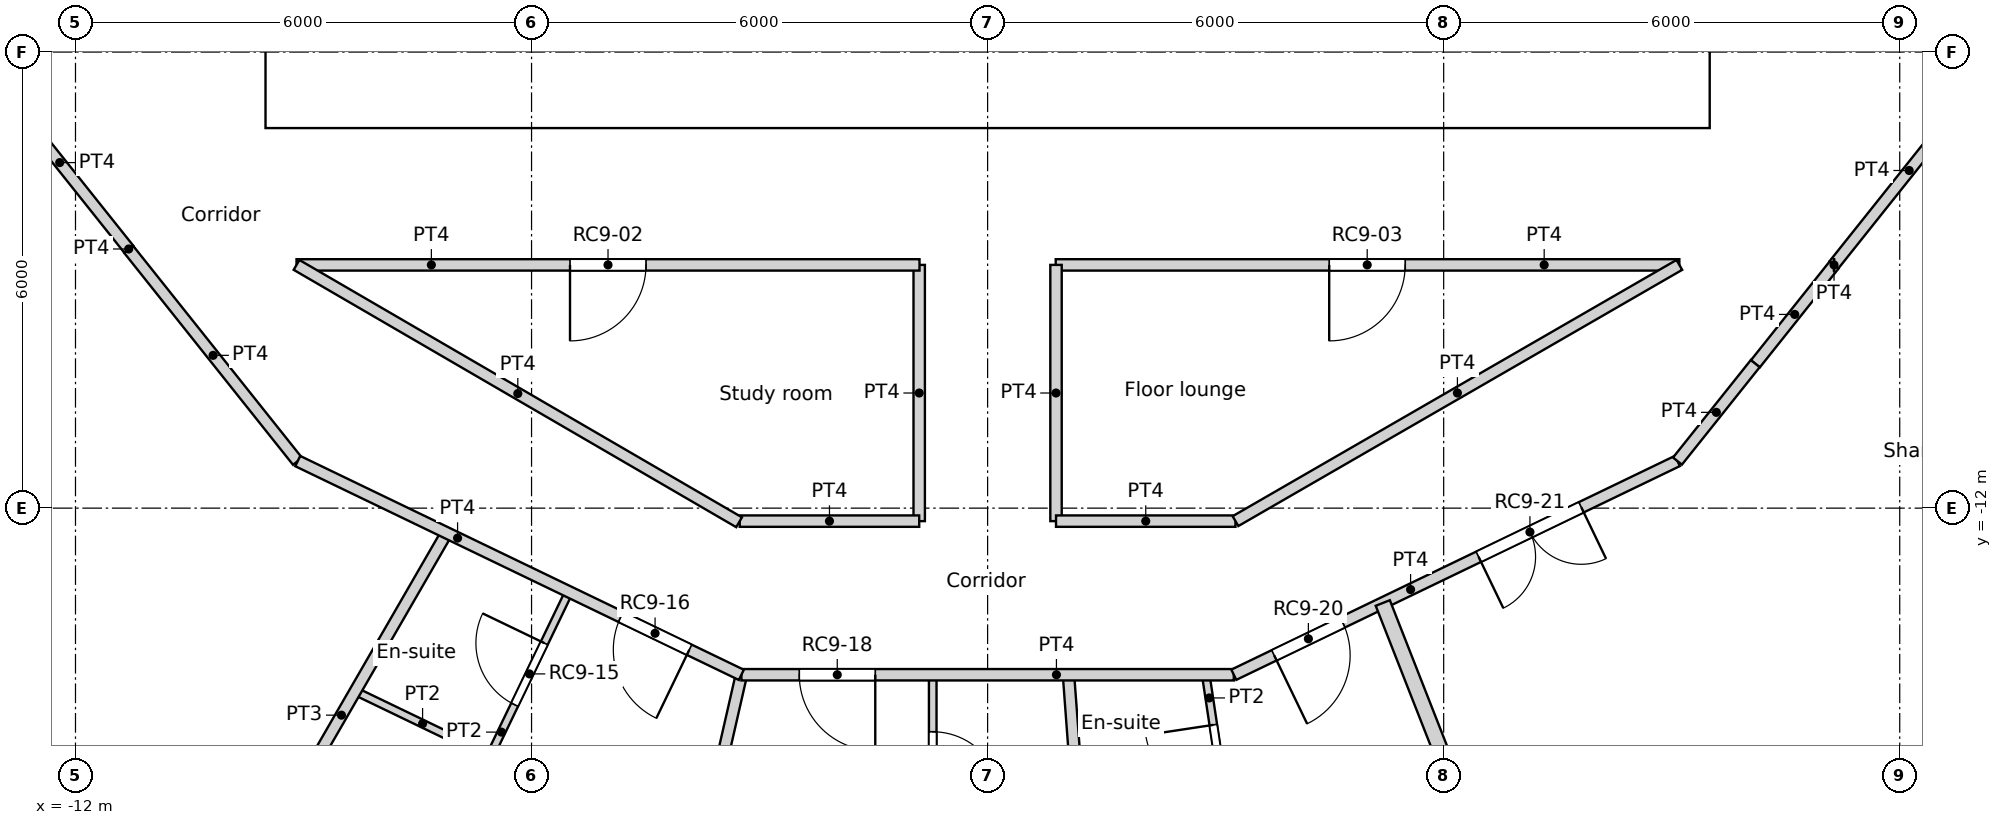
"""IFC4 building model, lengths in metres.
Left out: names, types, materials, properties, quantities, classifications, styles, units other than length and angle.
Written with IfcOpenShell. Run it as: python <this file> out.ifc"""

import sys

from ifc_helpers import new_model, si_unit, direction, frame, frame_2d, origin, origin_2d, place, context, subcontext, project, spatial, rectangle, circle, extrude, element, fill, save


model = new_model("IFC4")
c1 = context("Model", 3, precision=1e-05, world=origin(), true_north=direction((0.0, 1.0)))
c2 = subcontext(c1, "Body", "Model", "MODEL_VIEW")
j1 = project(units=[si_unit("LENGTHUNIT", "METRE"), si_unit("PLANEANGLEUNIT", "RADIAN")], contexts=[c1])
p1 = place(None, origin())
s1 = spatial("IfcSite", under=j1, at=p1, CompositionType="ELEMENT")
p2 = place(p1, origin())
s2 = spatial("IfcBuilding", under=s1, at=p2, CompositionType="ELEMENT")
p3 = place(p2, frame((0.0, 0.0, 316.2)))
s3 = spatial("IfcBuildingStorey", under=s2, at=p3, CompositionType="ELEMENT", Elevation=316.2)
p4 = place(p3, frame((11.735, -14.716, 0.0), z_axis=(0.0, 0.0, 1.0), x_axis=(1.0, 0.0, 0.0)))
e1 = element("IfcColumn", 1, at=p4, inside=s3, PredefinedType="COLUMN", context=c2, shape_type="SweptSolid", body=[
    extrude(circle(Radius=0.45, at=origin_2d()), origin(), (0.0, 0.0, 1.0), 3.6),
])
p5 = place(p3, frame((-9.5, -6.7, 0.0), z_axis=(0.0, 0.0, 1.0), x_axis=(1.0, 0.0, 0.0)))
e2 = element("IfcWall", 2, at=p5, inside=s3, PredefinedType="SOLIDWALL", context=c2, shape_type="SweptSolid", body=[
    extrude(rectangle(XDim=19.0, YDim=0.6, at=frame_2d((9.5, 0.0))), origin(), (0.0, 0.0, 1.0), 3.6),
])
p6 = place(p5, frame((10.4, 0.0, 0.0)))
e3 = element("IfcOpeningElement", 3, at=p6, cuts=e2, PredefinedType="OPENING", context=c2, shape_type="SweptSolid", body=[
    extrude(rectangle(XDim=1.0, YDim=2.1, at=frame_2d((0.5, 1.05))), frame((0.0, 0.3, 0.0), z_axis=(0.0, -1.0, 0.0), x_axis=(1.0, 0.0, 0.0)), (0.0, 0.0, 1.0), 0.6),
])
p7 = place(p5, frame((5.35, 0.0, 0.0)))
e4 = element("IfcOpeningElement", 4, at=p7, cuts=e2, PredefinedType="OPENING", context=c2, shape_type="SweptSolid", body=[
    extrude(rectangle(XDim=1.7, YDim=2.1, at=frame_2d((0.85, 1.05))), frame((0.0, 0.3, 0.0), z_axis=(0.0, -1.0, 0.0), x_axis=(1.0, 0.0, 0.0)), (0.0, 0.0, 1.0), 0.6),
])
p8 = place(p5, frame((11.95, 0.0, 0.0)))
e5 = element("IfcOpeningElement", 5, at=p8, cuts=e2, PredefinedType="OPENING", context=c2, shape_type="SweptSolid", body=[
    extrude(rectangle(XDim=1.7, YDim=2.1, at=frame_2d((0.85, 1.05))), frame((0.0, 0.3, 0.0), z_axis=(0.0, -1.0, 0.0), x_axis=(1.0, 0.0, 0.0)), (0.0, 0.0, 1.0), 0.6),
])
p9 = place(p3, frame((-9.2, -6.4, 0.0), z_axis=(0.0, 0.0, 1.0), x_axis=(0.0, 1.0, 0.0)))
e6 = element("IfcWall", 6, at=p9, inside=s3, PredefinedType="SOLIDWALL", context=c2, shape_type="SweptSolid", body=[
    extrude(rectangle(XDim=12.8, YDim=0.6, at=frame_2d((6.4, 0.0))), origin(), (0.0, 0.0, 1.0), 3.6),
])
p10 = place(p3, frame((9.2, -6.4, 0.0), z_axis=(0.0, 0.0, 1.0), x_axis=(0.0, 1.0, 0.0)))
e7 = element("IfcWall", 7, at=p10, inside=s3, PredefinedType="SOLIDWALL", context=c2, shape_type="SweptSolid", body=[
    extrude(rectangle(XDim=12.8, YDim=0.6, at=frame_2d((6.4, 0.0))), origin(), (0.0, 0.0, 1.0), 3.6),
])
p11 = place(p10, frame((6.4, 0.0, 0.0)))
e8 = element("IfcOpeningElement", 8, at=p11, cuts=e7, PredefinedType="OPENING", context=c2, shape_type="SweptSolid", body=[
    extrude(rectangle(XDim=1.8, YDim=2.1, at=frame_2d((0.9, 1.05))), frame((0.0, 0.3, 0.0), z_axis=(0.0, -1.0, 0.0), x_axis=(1.0, 0.0, 0.0)), (0.0, 0.0, 1.0), 0.6),
])
for number, where, z_axis, x_axis in (
    (9, (-2.25, -6.4, 0.0), (0.0, 0.0, 1.0), (0.0, 1.0, 0.0)),
    (10, (0.55, -6.4, 0.0), (0.0, 0.0, 1.0), (0.0, 1.0, 0.0)),
    (11, (2.25, -6.4, 0.0), (0.0, 0.0, 1.0), (0.0, 1.0, 0.0)),
):
    element("IfcWall", number, at=place(p3, frame(where, z_axis=z_axis, x_axis=x_axis)), inside=s3, PredefinedType="SOLIDWALL", context=c2, shape_type="SweptSolid", body=[
        extrude(rectangle(XDim=3.15, YDim=0.3, at=frame_2d((1.575, 0.0))), origin(), (0.0, 0.0, 1.0), 3.25),
    ])
p12 = place(p3, frame((-9.092, -8.8, 0.0), z_axis=(0.0, 0.0, 1.0), x_axis=(1.0, 0.0, 0.0)))
e12 = element("IfcWall", 12, at=p12, inside=s3, PredefinedType="PARTITIONING", context=c2, shape_type="SweptSolid", body=[
    extrude(rectangle(XDim=8.196, YDim=0.15, at=frame_2d((4.098, 0.0))), origin(), (0.0, 0.0, 1.0), 3.25),
])
p13 = place(p12, frame((3.598, 0.0, 0.0)))
e13 = element("IfcOpeningElement", 13, at=p13, cuts=e12, PredefinedType="OPENING", context=c2, shape_type="SweptSolid", body=[
    extrude(rectangle(XDim=1.0, YDim=2.04, at=frame_2d((0.5, 1.02))), frame((0.0, 0.075, 0.0), z_axis=(0.0, -1.0, 0.0), x_axis=(1.0, 0.0, 0.0)), (0.0, 0.0, 1.0), 0.15),
])
p14 = place(p3, frame((-9.092, -8.8, 0.0), z_axis=(0.0, 0.0, 1.0), x_axis=(0.864470922103, -0.502682827277, 0.0)))
e14 = element("IfcWall", 14, at=p14, inside=s3, PredefinedType="PARTITIONING", context=c2, shape_type="SweptSolid", body=[
    extrude(rectangle(XDim=6.735, YDim=0.15, at=frame_2d((3.368, 0.0))), origin(), (0.0, 0.0, 1.0), 3.25),
])
p15 = place(p3, frame((0.896, -8.8, 0.0), z_axis=(0.0, 0.0, 1.0), x_axis=(1.0, 0.0, 0.0)))
e15 = element("IfcWall", 15, at=p15, inside=s3, PredefinedType="PARTITIONING", context=c2, shape_type="SweptSolid", body=[
    extrude(rectangle(XDim=8.205, YDim=0.15, at=frame_2d((4.102, 0.0))), origin(), (0.0, 0.0, 1.0), 3.25),
])
p16 = place(p15, frame((3.598, 0.0, 0.0)))
e16 = element("IfcOpeningElement", 16, at=p16, cuts=e15, PredefinedType="OPENING", context=c2, shape_type="SweptSolid", body=[
    extrude(rectangle(XDim=1.0, YDim=2.04, at=frame_2d((0.5, 1.02))), frame((0.0, 0.075, 0.0), z_axis=(0.0, -1.0, 0.0), x_axis=(1.0, 0.0, 0.0)), (0.0, 0.0, 1.0), 0.15),
])
p17 = place(p3, frame((-11.3, -8.596, 0.0), z_axis=(0.0, 0.0, 1.0), x_axis=(0.623165080354, -0.782090328944, 0.0)))
e17 = element("IfcWall", 17, at=p17, inside=s3, PredefinedType="PARTITIONING", context=c2, shape_type="SweptSolid", body=[
    extrude(rectangle(XDim=3.564, YDim=0.15, at=frame_2d((1.782, 0.0))), origin(), (0.0, 0.0, 1.0), 3.25),
])
p18 = place(p3, frame((-11.3, -8.596, 0.0), z_axis=(0.0, 0.0, 1.0), x_axis=(0.0, 1.0, 0.0)))
e18 = element("IfcWall", 18, at=p18, inside=s3, PredefinedType="PARTITIONING", context=c2, shape_type="SweptSolid", body=[
    extrude(rectangle(XDim=0.011, YDim=0.15, at=frame_2d((0.006, 0.0))), origin(), (0.0, 0.0, 1.0), 3.25),
])
p19 = place(p3, frame((11.137, -8.8, 0.0), z_axis=(0.0, 0.0, 1.0), x_axis=(-1.0, 0.0, 0.0)))
e19 = element("IfcWall", 19, at=p19, inside=s3, PredefinedType="PARTITIONING", context=c2, shape_type="SweptSolid", body=[
    extrude(rectangle(XDim=0.003, YDim=0.15, at=frame_2d((0.001, 0.0))), origin(), (0.0, 0.0, 1.0), 3.25),
])
p20 = place(p3, frame((10.101, -10.101, 0.0), z_axis=(0.0, 0.0, 1.0), x_axis=(0.623098344652, 0.782143498913, 0.0)))
e20 = element("IfcWall", 20, at=p20, inside=s3, PredefinedType="PARTITIONING", context=c2, shape_type="SweptSolid", body=[
    extrude(rectangle(XDim=1.661, YDim=0.15, at=frame_2d((0.831, 0.0))), origin(), (0.0, 0.0, 1.0), 3.25),
])
p21 = place(p3, frame((11.134, -8.8, 0.0), z_axis=(0.0, 0.0, 1.0), x_axis=(0.623476099415, 0.781842409606, 0.0)))
e21 = element("IfcWall", 21, at=p21, inside=s3, PredefinedType="PARTITIONING", context=c2, shape_type="SweptSolid", body=[
    extrude(rectangle(XDim=3.177, YDim=0.15, at=frame_2d((1.589, 0.0))), origin(), (0.0, 0.0, 1.0), 3.25),
])
p22 = place(p3, frame((-13.115, -6.316, 0.0), z_axis=(0.0, 0.0, 1.0), x_axis=(0.623446514299, -0.781866001185, 0.0)))
e22 = element("IfcWall", 22, at=p22, inside=s3, PredefinedType="PARTITIONING", context=c2, shape_type="SweptSolid", body=[
    extrude(rectangle(XDim=2.911, YDim=0.15, at=frame_2d((1.456, 0.0))), origin(), (0.0, 0.0, 1.0), 3.25),
])
p23 = place(p3, frame((-3.261, -12.171, 0.0), z_axis=(0.0, 0.0, 1.0), x_axis=(1.0, 0.0, 0.0)))
e23 = element("IfcWall", 23, at=p23, inside=s3, PredefinedType="PARTITIONING", context=c2, shape_type="SweptSolid", body=[
    extrude(rectangle(XDim=2.361, YDim=0.15, at=frame_2d((1.181, 0.0))), origin(), (0.0, 0.0, 1.0), 3.25),
])
for number, where, z_axis, x_axis in (
    (24, (-0.9, -12.171, 0.0), (0.0, 0.0, 1.0), (0.0, 1.0, 0.0)),
    (25, (0.9, -12.171, 0.0), (0.0, 0.0, 1.0), (0.0, 1.0, 0.0)),
):
    element("IfcWall", number, at=place(p3, frame(where, z_axis=z_axis, x_axis=x_axis)), inside=s3, PredefinedType="PARTITIONING", context=c2, shape_type="SweptSolid", body=[
        extrude(rectangle(XDim=3.371, YDim=0.15, at=frame_2d((1.686, 0.0))), origin(), (0.0, 0.0, 1.0), 3.25),
    ])
p24 = place(p3, frame((0.9, -12.171, 0.0), z_axis=(0.0, 0.0, 1.0), x_axis=(1.0, 0.0, 0.0)))
e26 = element("IfcWall", 26, at=p24, inside=s3, PredefinedType="PARTITIONING", context=c2, shape_type="SweptSolid", body=[
    extrude(rectangle(XDim=2.361, YDim=0.15, at=frame_2d((1.181, 0.0))), origin(), (0.0, 0.0, 1.0), 3.25),
])
p25 = place(p3, frame((3.261, -12.171, 0.0), z_axis=(0.0, 0.0, 1.0), x_axis=(0.866066809554, 0.499928276245, 0.0)))
e27 = element("IfcWall", 27, at=p25, inside=s3, PredefinedType="PARTITIONING", context=c2, shape_type="SweptSolid", body=[
    extrude(rectangle(XDim=6.743, YDim=0.15, at=frame_2d((3.371, 0.0))), origin(), (0.0, 0.0, 1.0), 3.25),
])
p26 = place(p3, frame((-9.076, -11.381, 0.0), z_axis=(0.0, 0.0, 1.0), x_axis=(0.900851590682, -0.434127183629, 0.0)))
e28 = element("IfcWall", 28, at=p26, inside=s3, PredefinedType="PARTITIONING", context=c2, shape_type="SweptSolid", body=[
    extrude(rectangle(XDim=6.479, YDim=0.15, at=frame_2d((3.239, 0.0))), origin(), (0.0, 0.0, 1.0), 3.25),
])
p27 = place(p26, frame((4.719, 0.0, 0.0)))
e29 = element("IfcOpeningElement", 29, at=p27, cuts=e28, PredefinedType="OPENING", context=c2, shape_type="SweptSolid", body=[
    extrude(rectangle(XDim=1.0, YDim=2.1, at=frame_2d((0.5, 1.05))), frame((0.0, 0.075, 0.0), z_axis=(0.0, -1.0, 0.0), x_axis=(1.0, 0.0, 0.0)), (0.0, 0.0, 1.0), 0.15),
])
p28 = place(p3, frame((-3.239, -14.192, 0.0), z_axis=(0.0, 0.0, 1.0), x_axis=(1.0, 0.0, 0.0)))
e30 = element("IfcWall", 30, at=p28, inside=s3, PredefinedType="PARTITIONING", context=c2, shape_type="SweptSolid", body=[
    extrude(rectangle(XDim=6.478, YDim=0.15, at=frame_2d((3.239, 0.0))), origin(), (0.0, 0.0, 1.0), 3.25),
])
p29 = place(p28, frame((0.761, 0.0, 0.0)))
e31 = element("IfcOpeningElement", 31, at=p29, cuts=e30, PredefinedType="OPENING", context=c2, shape_type="SweptSolid", body=[
    extrude(rectangle(XDim=1.0, YDim=2.1, at=frame_2d((0.5, 1.05))), frame((0.0, 0.075, 0.0), z_axis=(0.0, -1.0, 0.0), x_axis=(1.0, 0.0, 0.0)), (0.0, 0.0, 1.0), 0.15),
])
p30 = place(p3, frame((3.239, -14.192, 0.0), z_axis=(0.0, 0.0, 1.0), x_axis=(0.900851590682, 0.434127183629, 0.0)))
e32 = element("IfcWall", 32, at=p30, inside=s3, PredefinedType="PARTITIONING", context=c2, shape_type="SweptSolid", body=[
    extrude(rectangle(XDim=6.479, YDim=0.15, at=frame_2d((3.239, 0.0))), origin(), (0.0, 0.0, 1.0), 3.25),
])
p31 = place(p30, frame((0.589, 0.0, 0.0)))
e33 = element("IfcOpeningElement", 33, at=p31, cuts=e32, PredefinedType="OPENING", context=c2, shape_type="SweptSolid", body=[
    extrude(rectangle(XDim=1.0, YDim=2.1, at=frame_2d((0.5, 1.05))), frame((0.0, 0.075, 0.0), z_axis=(0.0, -1.0, 0.0), x_axis=(1.0, 0.0, 0.0)), (0.0, 0.0, 1.0), 0.15),
])
p32 = place(p30, frame((3.575, 0.0, 0.0)))
e34 = element("IfcOpeningElement", 34, at=p32, cuts=e32, PredefinedType="OPENING", context=c2, shape_type="SweptSolid", body=[
    extrude(rectangle(XDim=1.5, YDim=2.1, at=frame_2d((0.75, 1.05))), frame((0.0, 0.075, 0.0), z_axis=(0.0, -1.0, 0.0), x_axis=(1.0, 0.0, 0.0)), (0.0, 0.0, 1.0), 0.15),
])
p33 = place(p3, frame((9.076, -11.381, 0.0), z_axis=(0.0, 0.0, 1.0), x_axis=(0.623805208652, 0.781579849829, 0.0)))
e35 = element("IfcWall", 35, at=p33, inside=s3, PredefinedType="PARTITIONING", context=c2, shape_type="SweptSolid", body=[
    extrude(rectangle(XDim=1.64, YDim=0.15, at=frame_2d((0.82, 0.0))), origin(), (0.0, 0.0, 1.0), 3.25),
])
p34 = place(p3, frame((-9.886, -17.122, 0.0), z_axis=(0.0, 0.0, 1.0), x_axis=(0.500073446025, 0.865982995549, 0.0)))
e36 = element("IfcWall", 36, at=p34, inside=s3, PredefinedType="PARTITIONING", context=c2, shape_type="SweptSolid", body=[
    extrude(rectangle(XDim=5.539, YDim=0.15, at=frame_2d((2.77, 0.0))), origin(), (0.0, 0.0, 1.0), 3.25),
])
p35 = place(p3, frame((-8.319, -14.409, 0.0), z_axis=(0.0, 0.0, 1.0), x_axis=(0.900936932599, -0.433950047216, 0.0)))
e37 = element("IfcWall", 37, at=p35, inside=s3, PredefinedType="PARTITIONING", context=c2, shape_type="SweptSolid", body=[
    extrude(rectangle(XDim=1.966, YDim=0.1, at=frame_2d((0.983, 0.0))), origin(), (0.0, 0.0, 1.0), 3.25),
])
p36 = place(p3, frame((-6.548, -15.262, 0.0), z_axis=(0.0, 0.0, 1.0), x_axis=(0.433855388624, 0.900982520231, 0.0)))
e38 = element("IfcWall", 38, at=p36, inside=s3, PredefinedType="PARTITIONING", context=c2, shape_type="SweptSolid", body=[
    extrude(rectangle(XDim=2.399, YDim=0.1, at=frame_2d((1.2, 0.0))), origin(), (0.0, 0.0, 1.0), 3.25),
])
p37 = place(p36, frame((0.75, 0.0, 0.0)))
e39 = element("IfcOpeningElement", 39, at=p37, cuts=e38, PredefinedType="OPENING", context=c2, shape_type="SweptSolid", body=[
    extrude(rectangle(XDim=0.9, YDim=2.04, at=frame_2d((0.45, 1.02))), frame((0.0, 0.05, 0.0), z_axis=(0.0, -1.0, 0.0), x_axis=(1.0, 0.0, 0.0)), (0.0, 0.0, 1.0), 0.1),
])
p38 = place(p3, frame((-4.4, -19.276, 0.0), z_axis=(0.0, 0.0, 1.0), x_axis=(0.222612505682, 0.974907007008, 0.0)))
e40 = element("IfcWall", 40, at=p38, inside=s3, PredefinedType="PARTITIONING", context=c2, shape_type="SweptSolid", body=[
    extrude(rectangle(XDim=5.215, YDim=0.15, at=frame_2d((2.607, 0.0))), origin(), (0.0, 0.0, 1.0), 3.25),
])
p39 = place(p3, frame((-0.722, -16.592, 0.0), z_axis=(0.0, 0.0, 1.0), x_axis=(0.0, 1.0, 0.0)))
e41 = element("IfcWall", 41, at=p39, inside=s3, PredefinedType="PARTITIONING", context=c2, shape_type="SweptSolid", body=[
    extrude(rectangle(XDim=2.4, YDim=0.1, at=frame_2d((1.2, 0.0))), origin(), (0.0, 0.0, 1.0), 3.25),
])
p40 = place(p39, frame((0.75, 0.0, 0.0)))
e42 = element("IfcOpeningElement", 42, at=p40, cuts=e41, PredefinedType="OPENING", context=c2, shape_type="SweptSolid", body=[
    extrude(rectangle(XDim=0.9, YDim=2.04, at=frame_2d((0.45, 1.02))), frame((0.0, 0.05, 0.0), z_axis=(0.0, -1.0, 0.0), x_axis=(1.0, 0.0, 0.0)), (0.0, 0.0, 1.0), 0.1),
])
p41 = place(p3, frame((1.064, -14.192, 0.0), z_axis=(0.0, 0.0, 1.0), x_axis=(0.074353677934, -0.997231934195, 0.0)))
e43 = element("IfcWall", 43, at=p41, inside=s3, PredefinedType="PARTITIONING", context=c2, shape_type="SweptSolid", body=[
    extrude(rectangle(XDim=2.407, YDim=0.15, at=frame_2d((1.203, 0.0))), origin(), (0.0, 0.0, 1.0), 3.25),
])
p42 = place(p3, frame((2.87, -14.192, 0.0), z_axis=(0.0, 0.0, 1.0), x_axis=(0.148960349288, -0.988843169739, 0.0)))
e44 = element("IfcWall", 44, at=p42, inside=s3, PredefinedType="PARTITIONING", context=c2, shape_type="SweptSolid", body=[
    extrude(rectangle(XDim=2.234, YDim=0.1, at=frame_2d((1.117, 0.0))), origin(), (0.0, 0.0, 1.0), 3.25),
])
p43 = place(p42, frame((0.667, 0.0, 0.0)))
e45 = element("IfcOpeningElement", 45, at=p43, cuts=e44, PredefinedType="OPENING", context=c2, shape_type="SweptSolid", body=[
    extrude(rectangle(XDim=0.9, YDim=2.04, at=frame_2d((0.45, 1.02))), frame((0.0, 0.05, 0.0), z_axis=(0.0, -1.0, 0.0), x_axis=(1.0, 0.0, 0.0)), (0.0, 0.0, 1.0), 0.1),
])
p44 = place(p3, frame((5.199, -13.248, 0.0), z_axis=(0.0, 0.0, 1.0), x_axis=(0.365334662456, -0.930876245485, 0.0)))
e46 = element("IfcWall", 46, at=p44, inside=s3, PredefinedType="PARTITIONING", context=c2, shape_type="SweptSolid", body=[
    extrude(rectangle(XDim=5.54, YDim=0.2, at=frame_2d((2.77, 0.0))), origin(), (0.0, 0.0, 1.0), 3.25),
])
p45 = place(p6, origin())
e47 = element("IfcDoor", 47, at=p45, inside=s3, OperationType="SINGLE_SWING_LEFT", PredefinedType="DOOR", context=c2, shape_type="SweptSolid", body=[
    extrude(rectangle(XDim=1.0, YDim=2.1, at=frame_2d((0.5, 1.05))), frame((0.0, 0.025, 0.0), z_axis=(0.0, -1.0, 0.0), x_axis=(1.0, 0.0, 0.0)), (0.0, 0.0, 1.0), 0.05),
])
fill(e3, e47)
p46 = place(p7, origin())
e48 = element("IfcDoor", 48, at=p46, inside=s3, OperationType="DOUBLE_DOOR_SINGLE_SWING", PredefinedType="DOOR", context=c2, shape_type="SweptSolid", body=[
    extrude(rectangle(XDim=1.7, YDim=2.1, at=frame_2d((0.85, 1.05))), frame((0.0, 0.025, 0.0), z_axis=(0.0, -1.0, 0.0), x_axis=(1.0, 0.0, 0.0)), (0.0, 0.0, 1.0), 0.05),
])
fill(e4, e48)
p47 = place(p8, origin())
e49 = element("IfcDoor", 49, at=p47, inside=s3, OperationType="DOUBLE_DOOR_SINGLE_SWING", PredefinedType="DOOR", context=c2, shape_type="SweptSolid", body=[
    extrude(rectangle(XDim=1.7, YDim=2.1, at=frame_2d((0.85, 1.05))), frame((0.0, 0.025, 0.0), z_axis=(0.0, -1.0, 0.0), x_axis=(1.0, 0.0, 0.0)), (0.0, 0.0, 1.0), 0.05),
])
fill(e5, e49)
p48 = place(p13, origin())
e50 = element("IfcDoor", 50, at=p48, inside=s3, OperationType="SINGLE_SWING_RIGHT", PredefinedType="DOOR", context=c2, shape_type="SweptSolid", body=[
    extrude(rectangle(XDim=1.0, YDim=2.04, at=frame_2d((0.5, 1.02))), frame((0.0, 0.025, 0.0), z_axis=(0.0, -1.0, 0.0), x_axis=(1.0, 0.0, 0.0)), (0.0, 0.0, 1.0), 0.05),
])
fill(e13, e50)
p49 = place(p16, origin())
e51 = element("IfcDoor", 51, at=p49, inside=s3, OperationType="SINGLE_SWING_RIGHT", PredefinedType="DOOR", context=c2, shape_type="SweptSolid", body=[
    extrude(rectangle(XDim=1.0, YDim=2.04, at=frame_2d((0.5, 1.02))), frame((0.0, 0.025, 0.0), z_axis=(0.0, -1.0, 0.0), x_axis=(1.0, 0.0, 0.0)), (0.0, 0.0, 1.0), 0.05),
])
fill(e16, e51)
p50 = place(p37, origin())
e52 = element("IfcDoor", 52, at=p50, inside=s3, OperationType="SINGLE_SWING_RIGHT", PredefinedType="DOOR", context=c2, shape_type="SweptSolid", body=[
    extrude(rectangle(XDim=0.9, YDim=2.04, at=frame_2d((0.45, 1.02))), frame((0.0, 0.025, 0.0), z_axis=(0.0, -1.0, 0.0), x_axis=(1.0, 0.0, 0.0)), (0.0, 0.0, 1.0), 0.05),
])
fill(e39, e52)
p51 = place(p27, origin())
e53 = element("IfcDoor", 53, at=p51, inside=s3, OperationType="SINGLE_SWING_LEFT", PredefinedType="DOOR", context=c2, shape_type="SweptSolid", body=[
    extrude(rectangle(XDim=1.0, YDim=2.1, at=frame_2d((0.5, 1.05))), frame((0.0, 0.025, 0.0), z_axis=(0.0, -1.0, 0.0), x_axis=(1.0, 0.0, 0.0)), (0.0, 0.0, 1.0), 0.05),
])
fill(e29, e53)
p52 = place(p40, origin())
e54 = element("IfcDoor", 54, at=p52, inside=s3, OperationType="SINGLE_SWING_RIGHT", PredefinedType="DOOR", context=c2, shape_type="SweptSolid", body=[
    extrude(rectangle(XDim=0.9, YDim=2.04, at=frame_2d((0.45, 1.02))), frame((0.0, 0.025, 0.0), z_axis=(0.0, -1.0, 0.0), x_axis=(1.0, 0.0, 0.0)), (0.0, 0.0, 1.0), 0.05),
])
fill(e42, e54)
p53 = place(p29, origin())
e55 = element("IfcDoor", 55, at=p53, inside=s3, OperationType="SINGLE_SWING_LEFT", PredefinedType="DOOR", context=c2, shape_type="SweptSolid", body=[
    extrude(rectangle(XDim=1.0, YDim=2.1, at=frame_2d((0.5, 1.05))), frame((0.0, 0.025, 0.0), z_axis=(0.0, -1.0, 0.0), x_axis=(1.0, 0.0, 0.0)), (0.0, 0.0, 1.0), 0.05),
])
fill(e31, e55)
p54 = place(p43, origin())
e56 = element("IfcDoor", 56, at=p54, inside=s3, OperationType="SINGLE_SWING_RIGHT", PredefinedType="DOOR", context=c2, shape_type="SweptSolid", body=[
    extrude(rectangle(XDim=0.9, YDim=2.04, at=frame_2d((0.45, 1.02))), frame((0.0, 0.025, 0.0), z_axis=(0.0, -1.0, 0.0), x_axis=(1.0, 0.0, 0.0)), (0.0, 0.0, 1.0), 0.05),
])
fill(e45, e56)
p55 = place(p31, origin())
e57 = element("IfcDoor", 57, at=p55, inside=s3, OperationType="SINGLE_SWING_RIGHT", PredefinedType="DOOR", context=c2, shape_type="SweptSolid", body=[
    extrude(rectangle(XDim=1.0, YDim=2.1, at=frame_2d((0.5, 1.05))), frame((0.0, 0.025, 0.0), z_axis=(0.0, -1.0, 0.0), x_axis=(1.0, 0.0, 0.0)), (0.0, 0.0, 1.0), 0.05),
])
fill(e33, e57)
p56 = place(p32, origin())
e58 = element("IfcDoor", 58, at=p56, inside=s3, OperationType="DOUBLE_DOOR_SINGLE_SWING", PredefinedType="DOOR", context=c2, shape_type="SweptSolid", body=[
    extrude(rectangle(XDim=1.5, YDim=2.1, at=frame_2d((0.75, 1.05))), frame((0.0, 0.025, 0.0), z_axis=(0.0, -1.0, 0.0), x_axis=(1.0, 0.0, 0.0)), (0.0, 0.0, 1.0), 0.05),
])
fill(e34, e58)
save(model, sys.argv[1])
